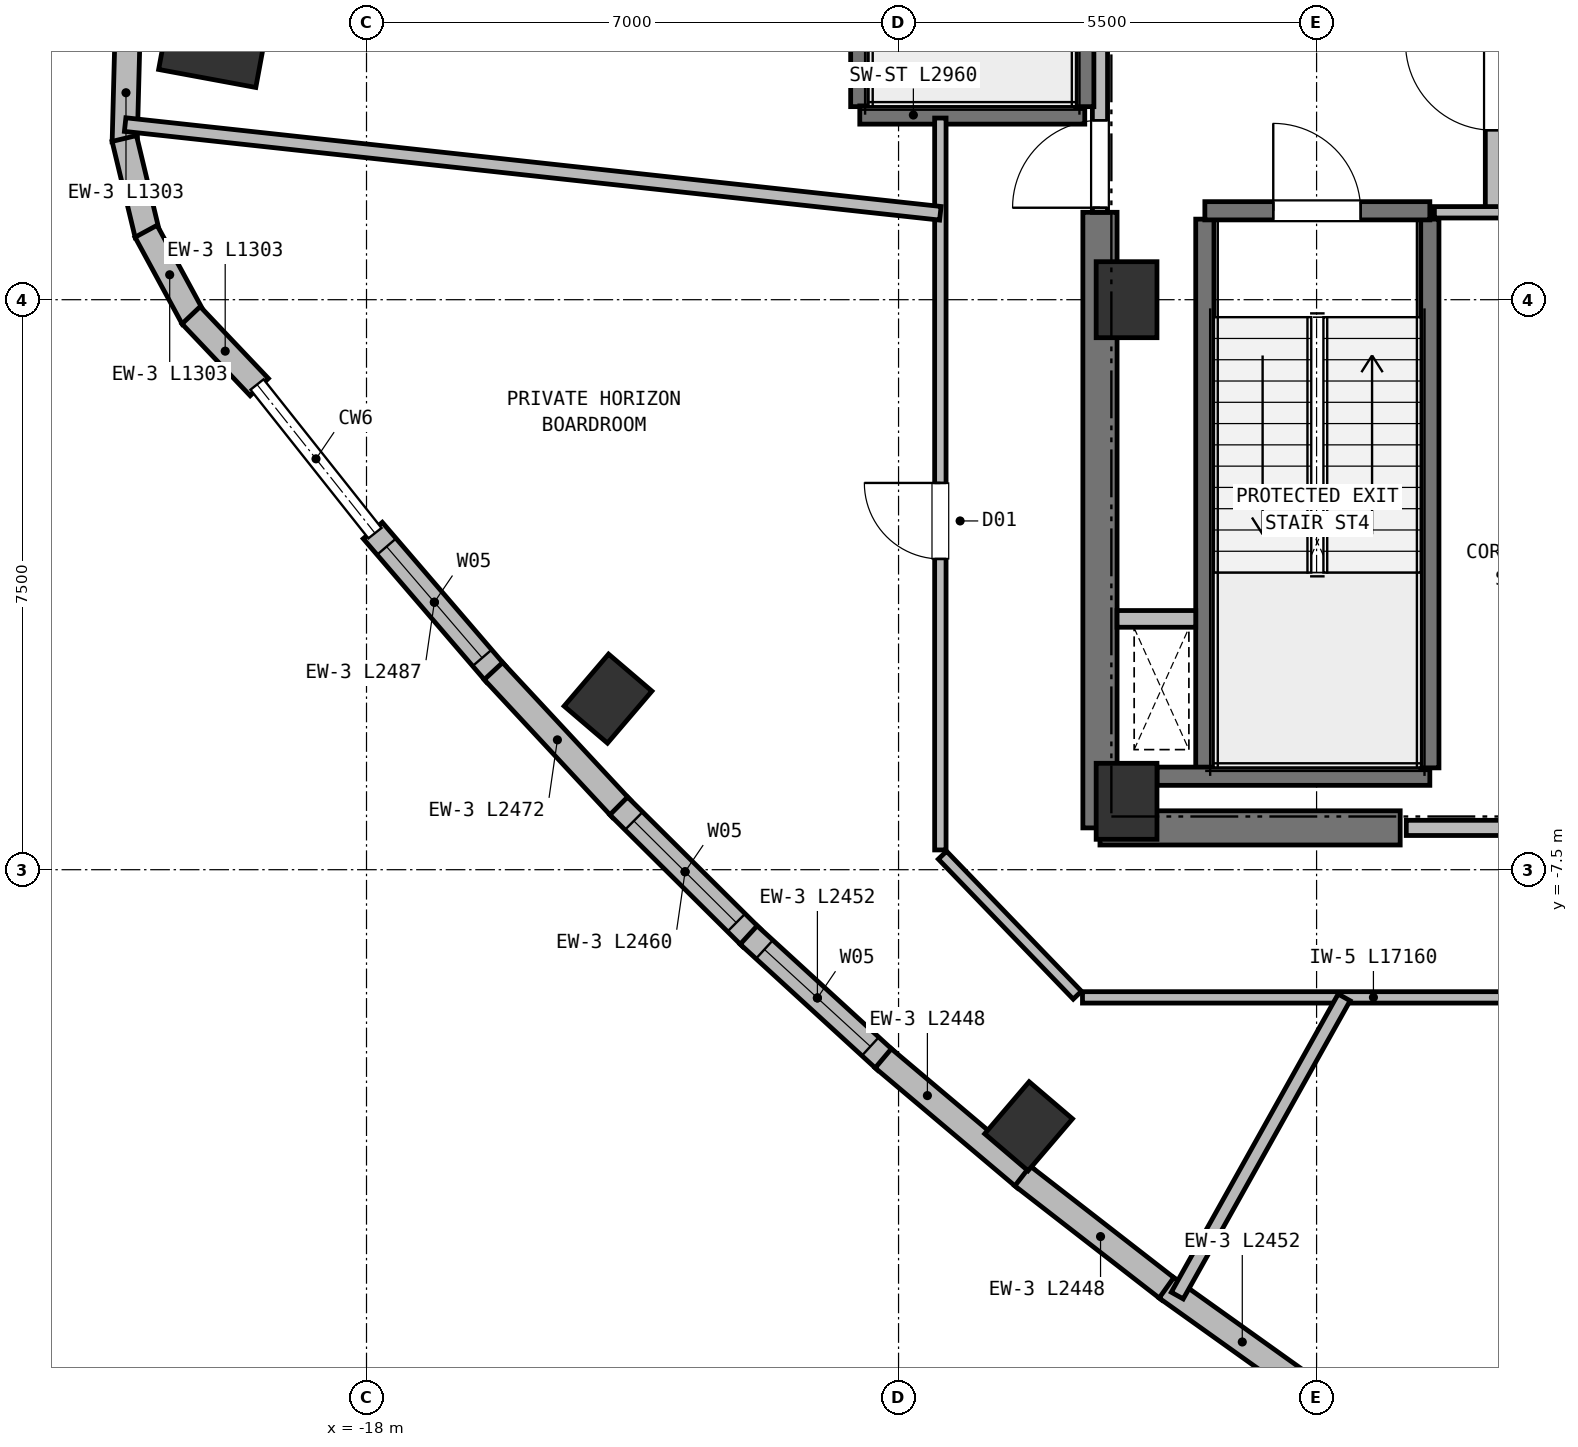
"""IFC4 building model, lengths in metres.
Left out: names, types, materials, properties, quantities, classifications, styles, units other than length and angle.
Written with IfcOpenShell. Run it as: python <this file> out.ifc"""

import sys

from ifc_helpers import new_model, si_unit, direction, frame, frame_2d, origin, origin_2d, place, context, subcontext, project, spatial, rectangle, extrude, element, fill, save


model = new_model("IFC4")
c1 = context("Model", 3, precision=1e-05, world=origin(), true_north=direction((0.0, 1.0)))
c2 = subcontext(c1, "Body", "Model", "MODEL_VIEW")
j1 = project(units=[si_unit("LENGTHUNIT", "METRE"), si_unit("PLANEANGLEUNIT", "RADIAN")], contexts=[c1])
p1 = place(None, origin())
s1 = spatial("IfcSite", under=j1, at=p1, CompositionType="ELEMENT")
p2 = place(p1, origin())
s2 = spatial("IfcBuilding", under=s1, at=p2, CompositionType="ELEMENT")
p3 = place(p2, frame((0.0, 0.0, 277.2)))
s3 = spatial("IfcBuildingStorey", under=s2, at=p3, CompositionType="ELEMENT", Elevation=277.2)
for number, where, z_axis, x_axis in (
    (1, (-8.0, -6.6, 0.0), (0.0, 0.0, 1.0), (1.0, 0.0, 0.0)),
    (2, (-8.0, 0.0, 0.0), (0.0, 0.0, 1.0), (1.0, 0.0, 0.0)),
):
    element("IfcColumn", number, at=place(p3, frame(where, z_axis=z_axis, x_axis=x_axis)), inside=s3, PredefinedType="COLUMN", context=c2, shape_type="SweptSolid", body=[
        extrude(rectangle(XDim=0.8, YDim=1.0, at=origin_2d()), origin(), (0.0, 0.0, 1.0), 4.4),
    ])
p4 = place(p3, frame((-8.35, -6.95, 0.0), z_axis=(0.0, 0.0, 1.0), x_axis=(1.0, 0.0, 0.0)))
e3 = element("IfcWall", 3, at=p4, inside=s3, PredefinedType="SHEAR", context=c2, shape_type="SweptSolid", body=[
    extrude(rectangle(XDim=3.95, YDim=0.45, at=frame_2d((1.975, 0.0))), origin(), (0.0, 0.0, 1.0), 4.15),
])
p5 = place(p3, frame((-8.35, -6.95, 0.0), z_axis=(0.0, 0.0, 1.0), x_axis=(0.0, 1.0, 0.0)))
e4 = element("IfcWall", 4, at=p5, inside=s3, PredefinedType="SHEAR", context=c2, shape_type="SweptSolid", body=[
    extrude(rectangle(XDim=8.1, YDim=0.45, at=frame_2d((4.05, 0.0))), origin(), (0.0, 0.0, 1.0), 4.15),
])
p6 = place(p3, frame((-19.95, 3.698, 0.0), z_axis=(0.0, 0.0, 1.0), x_axis=(-0.983254907564, 0.182235525492, 0.0)))
e5 = element("IfcColumn", 5, at=p6, inside=s3, PredefinedType="COLUMN", context=c2, shape_type="SweptSolid", body=[
    extrude(rectangle(XDim=1.3, YDim=1.6, at=origin_2d()), origin(), (0.0, 0.0, 1.0), 4.4),
])
for number, where, z_axis, x_axis in (
    (6, (-14.823, -5.249, 0.0), (0.0, 0.0, 1.0), (-0.76, 0.649, 0.0)),
    (7, (-9.289, -10.876, 0.0), (0.0, 0.0, 1.0), (-0.76, 0.649, 0.0)),
):
    element("IfcColumn", number, at=place(p3, frame(where, z_axis=z_axis, x_axis=x_axis)), inside=s3, PredefinedType="COLUMN", context=c2, shape_type="SweptSolid", body=[
        extrude(rectangle(XDim=0.75, YDim=0.9, at=origin_2d()), origin(), (0.0, 0.0, 1.0), 4.4),
    ])
for number, where, z_axis, x_axis in (
    (8, (-21.182, 2.072, 0.0), (0.0, 0.0, 1.0), (0.026, 1.0, 0.0)),
    (9, (-20.883, 0.854, 0.0), (0.0, 0.0, 1.0), (-0.233, 0.972, 0.0)),
    (10, (-20.279, -0.245, 0.0), (0.0, 0.0, 1.0), (-0.477, 0.879, 0.0)),
):
    element("IfcWall", number, at=place(p3, frame(where, z_axis=z_axis, x_axis=x_axis)), inside=s3, PredefinedType="SOLIDWALL", context=c2, shape_type="SweptSolid", body=[
        extrude(rectangle(XDim=1.303, YDim=0.33, at=frame_2d((0.651, 0.0))), origin(), (0.0, 0.0, 1.0), 4.15),
    ])
p7 = place(p3, frame((-19.411, -1.15, 0.0), z_axis=(0.0, 0.0, 1.0), x_axis=(-0.688316050819, 0.725410927809, 0.0)))
e11 = element("IfcWall", 11, at=p7, inside=s3, PredefinedType="SOLIDWALL", context=c2, shape_type="SweptSolid", body=[
    extrude(rectangle(XDim=1.303, YDim=0.33, at=frame_2d((0.652, 0.0))), origin(), (0.0, 0.0, 1.0), 4.15),
])
p8 = place(p3, frame((-16.297, -4.924, 0.0), z_axis=(0.0, 0.0, 1.0), x_axis=(-0.651591190477, 0.75857031348, 0.0)))
e12 = element("IfcWall", 12, at=p8, inside=s3, PredefinedType="SOLIDWALL", context=c2, shape_type="SweptSolid", body=[
    extrude(rectangle(XDim=2.488, YDim=0.33, at=frame_2d((1.244, 0.0))), origin(), (0.0, 0.0, 1.0), 4.15),
])
p9 = place(p8, frame((0.279, 0.0, 0.72)))
e13 = element("IfcOpeningElement", 13, at=p9, cuts=e12, PredefinedType="OPENING", context=c2, shape_type="SweptSolid", body=[
    extrude(rectangle(XDim=1.93, YDim=2.15, at=frame_2d((0.965, 1.075))), frame((0.0, 0.175, 0.0), z_axis=(0.0, -1.0, 0.0), x_axis=(1.0, 0.0, 0.0)), (0.0, 0.0, 1.0), 0.35),
])
p10 = place(p3, frame((-14.647, -6.697, 0.0), z_axis=(0.0, 0.0, 1.0), x_axis=(-0.681011582837, 0.732272643242, 0.0)))
e14 = element("IfcWall", 14, at=p10, inside=s3, PredefinedType="SOLIDWALL", context=c2, shape_type="SweptSolid", body=[
    extrude(rectangle(XDim=2.472, YDim=0.33, at=frame_2d((1.236, 0.0))), origin(), (0.0, 0.0, 1.0), 4.15),
])
p11 = place(p3, frame((-12.936, -8.394, 0.0), z_axis=(0.0, 0.0, 1.0), x_axis=(-0.709682736457, 0.704521407464, 0.0)))
e15 = element("IfcWall", 15, at=p11, inside=s3, PredefinedType="SOLIDWALL", context=c2, shape_type="SweptSolid", body=[
    extrude(rectangle(XDim=2.46, YDim=0.33, at=frame_2d((1.23, 0.0))), origin(), (0.0, 0.0, 1.0), 4.15),
])
p12 = place(p11, frame((0.28, 0.0, 0.72)))
e16 = element("IfcOpeningElement", 16, at=p12, cuts=e15, PredefinedType="OPENING", context=c2, shape_type="SweptSolid", body=[
    extrude(rectangle(XDim=1.9, YDim=2.15, at=frame_2d((0.95, 1.075))), frame((0.0, 0.175, 0.0), z_axis=(0.0, -1.0, 0.0), x_axis=(1.0, 0.0, 0.0)), (0.0, 0.0, 1.0), 0.35),
])
p13 = place(p3, frame((-11.164, -10.015, 0.0), z_axis=(0.0, 0.0, 1.0), x_axis=(-0.73744340021, 0.675408936487, 0.0)))
e17 = element("IfcWall", 17, at=p13, inside=s3, PredefinedType="SOLIDWALL", context=c2, shape_type="SweptSolid", body=[
    extrude(rectangle(XDim=2.452, YDim=0.33, at=frame_2d((1.226, 0.0))), origin(), (0.0, 0.0, 1.0), 4.15),
])
p14 = place(p13, frame((0.281, 0.0, 0.72)))
e18 = element("IfcOpeningElement", 18, at=p14, cuts=e17, PredefinedType="OPENING", context=c2, shape_type="SweptSolid", body=[
    extrude(rectangle(XDim=1.89, YDim=2.15, at=frame_2d((0.945, 1.075))), frame((0.0, 0.175, 0.0), z_axis=(0.0, -1.0, 0.0), x_axis=(1.0, 0.0, 0.0)), (0.0, 0.0, 1.0), 0.35),
])
p15 = place(p3, frame((-9.33, -11.561, 0.0), z_axis=(0.0, 0.0, 1.0), x_axis=(-0.764225429478, 0.644949217334, 0.0)))
e19 = element("IfcWall", 19, at=p15, inside=s3, PredefinedType="SOLIDWALL", context=c2, shape_type="SweptSolid", body=[
    extrude(rectangle(XDim=2.448, YDim=0.33, at=frame_2d((1.224, 0.0))), origin(), (0.0, 0.0, 1.0), 4.15),
])
p16 = place(p3, frame((-7.435, -13.031, 0.0), z_axis=(0.0, 0.0, 1.0), x_axis=(-0.789786954421, 0.613381257152, 0.0)))
e20 = element("IfcWall", 20, at=p16, inside=s3, PredefinedType="SOLIDWALL", context=c2, shape_type="SweptSolid", body=[
    extrude(rectangle(XDim=2.448, YDim=0.33, at=frame_2d((1.224, 0.0))), origin(), (0.0, 0.0, 1.0), 4.15),
])
p17 = place(p3, frame((-5.48, -14.427, 0.0), z_axis=(0.0, 0.0, 1.0), x_axis=(-0.813854547638, 0.581068649378, 0.0)))
e21 = element("IfcWall", 21, at=p17, inside=s3, PredefinedType="SOLIDWALL", context=c2, shape_type="SweptSolid", body=[
    extrude(rectangle(XDim=2.452, YDim=0.33, at=frame_2d((1.226, 0.0))), origin(), (0.0, 0.0, 1.0), 4.15),
])
p18 = place(p3, frame((-6.97, -6.16, 0.0), z_axis=(0.0, 0.0, 1.0), x_axis=(0.0, 1.0, 0.0)))
e22 = element("IfcWall", 22, at=p18, inside=s3, PredefinedType="SHEAR", context=c2, shape_type="SweptSolid", body=[
    extrude(rectangle(XDim=7.22, YDim=0.24, at=frame_2d((3.61, 0.0))), origin(), (0.0, 0.0, 1.0), 4.15),
])
p19 = place(p3, frame((-7.6, -6.27, 0.0), z_axis=(0.0, 0.0, 1.0), x_axis=(1.0, 0.0, 0.0)))
e23 = element("IfcWall", 23, at=p19, inside=s3, PredefinedType="SHEAR", context=c2, shape_type="SweptSolid", body=[
    extrude(rectangle(XDim=3.59, YDim=0.24, at=frame_2d((1.795, 0.0))), origin(), (0.0, 0.0, 1.0), 4.15),
])
p20 = place(p3, frame((-4.01, -6.16, 0.0), z_axis=(0.0, 0.0, 1.0), x_axis=(0.0, 1.0, 0.0)))
e24 = element("IfcWall", 24, at=p20, inside=s3, PredefinedType="SHEAR", context=c2, shape_type="SweptSolid", body=[
    extrude(rectangle(XDim=7.22, YDim=0.24, at=frame_2d((3.61, 0.0))), origin(), (0.0, 0.0, 1.0), 4.15),
])
p21 = place(p3, frame((-6.97, 1.17, 0.0), z_axis=(0.0, 0.0, 1.0), x_axis=(1.0, 0.0, 0.0)))
e25 = element("IfcWall", 25, at=p21, inside=s3, PredefinedType="SHEAR", context=c2, shape_type="SweptSolid", body=[
    extrude(rectangle(XDim=2.96, YDim=0.24, at=frame_2d((1.48, 0.0))), origin(), (0.0, 0.0, 1.0), 4.15),
])
p22 = place(p21, frame((0.9, 0.0, 0.0)))
e26 = element("IfcOpeningElement", 26, at=p22, cuts=e25, PredefinedType="OPENING", context=c2, shape_type="SweptSolid", body=[
    extrude(rectangle(XDim=1.15, YDim=2.15, at=frame_2d((0.575, 1.075))), frame((0.0, 0.13, 0.0), z_axis=(0.0, -1.0, 0.0), x_axis=(1.0, 0.0, 0.0)), (0.0, 0.0, 1.0), 0.26),
])
p23 = place(p3, frame((-8.125, -4.2, 0.0), z_axis=(0.0, 0.0, 1.0), x_axis=(1.0, 0.0, 0.0)))
e27 = element("IfcWall", 27, at=p23, inside=s3, PredefinedType="PARTITIONING", context=c2, shape_type="SweptSolid", body=[
    extrude(rectangle(XDim=1.035, YDim=0.22, at=frame_2d((0.518, 0.0))), origin(), (0.0, 0.0, 1.0), 4.15),
])
p24 = place(p3, frame((-3.18, 1.15, 0.0), z_axis=(0.0, 0.0, 1.0), x_axis=(0.0, 1.0, 0.0)))
e28 = element("IfcWall", 28, at=p24, inside=s3, PredefinedType="PARTITIONING", context=c2, shape_type="SweptSolid", body=[
    extrude(rectangle(XDim=3.3, YDim=0.2, at=frame_2d((1.65, 0.0))), origin(), (0.0, 0.0, 1.0), 4.15),
])
p25 = place(p24, frame((1.08, 0.0, 0.0)))
e29 = element("IfcOpeningElement", 29, at=p25, cuts=e28, PredefinedType="OPENING", context=c2, shape_type="SweptSolid", body=[
    extrude(rectangle(XDim=1.15, YDim=2.15, at=frame_2d((0.575, 1.075))), frame((0.0, 0.11, 0.0), z_axis=(0.0, -1.0, 0.0), x_axis=(1.0, 0.0, 0.0)), (0.0, 0.0, 1.0), 0.22),
])
p26 = place(p3, frame((-8.35, 1.15, 0.0), z_axis=(0.0, 0.0, 1.0), x_axis=(0.0, 1.0, 0.0)))
e30 = element("IfcWall", 30, at=p26, inside=s3, PredefinedType="PARTITIONING", context=c2, shape_type="SweptSolid", body=[
    extrude(rectangle(XDim=5.4, YDim=0.2, at=frame_2d((2.7, 0.0))), origin(), (0.0, 0.0, 1.0), 4.15),
])
p27 = place(p26, frame((0.06, 0.0, 0.0)))
e31 = element("IfcOpeningElement", 31, at=p27, cuts=e30, PredefinedType="OPENING", context=c2, shape_type="SweptSolid", body=[
    extrude(rectangle(XDim=1.15, YDim=2.15, at=frame_2d((0.575, 1.075))), frame((0.0, 0.11, 0.0), z_axis=(0.0, -1.0, 0.0), x_axis=(1.0, 0.0, 0.0)), (0.0, 0.0, 1.0), 0.22),
])
p28 = place(p3, frame((3.95, 1.15, 0.0), z_axis=(0.0, 0.0, 1.0), x_axis=(-1.0, 0.0, 0.0)))
e32 = element("IfcWall", 32, at=p28, inside=s3, PredefinedType="PARTITIONING", context=c2, shape_type="SweptSolid", body=[
    extrude(rectangle(XDim=7.9, YDim=0.15, at=frame_2d((3.95, 0.0))), origin(), (0.0, 0.0, 1.0), 4.15),
])
p29 = place(p28, frame((5.59, 0.0, 0.0)))
e33 = element("IfcOpeningElement", 33, at=p29, cuts=e32, PredefinedType="OPENING", context=c2, shape_type="SweptSolid", body=[
    extrude(rectangle(XDim=0.92, YDim=2.05, at=frame_2d((0.46, 1.025))), frame((0.0, 0.085, 0.0), z_axis=(0.0, -1.0, 0.0), x_axis=(1.0, 0.0, 0.0)), (0.0, 0.0, 1.0), 0.17),
])
p30 = place(p28, frame((2.14, 0.0, 0.0)))
e34 = element("IfcOpeningElement", 34, at=p30, cuts=e32, PredefinedType="OPENING", context=c2, shape_type="SweptSolid", body=[
    extrude(rectangle(XDim=0.92, YDim=2.05, at=frame_2d((0.46, 1.025))), frame((0.0, 0.085, 0.0), z_axis=(0.0, -1.0, 0.0), x_axis=(1.0, 0.0, 0.0)), (0.0, 0.0, 1.0), 0.17),
])
p31 = place(p3, frame((-4.32, -6.95, 0.0), z_axis=(0.0, 0.0, 1.0), x_axis=(1.0, 0.0, 0.0)))
e35 = element("IfcWall", 35, at=p31, inside=s3, PredefinedType="PARTITIONING", context=c2, shape_type="SweptSolid", body=[
    extrude(rectangle(XDim=8.64, YDim=0.2, at=frame_2d((4.32, 0.0))), origin(), (0.0, 0.0, 1.0), 4.15),
])
p32 = place(p3, frame((-11.51, 2.54, 0.0), z_axis=(0.0, 0.0, 1.0), x_axis=(0.0, 1.0, 0.0)))
e36 = element("IfcWall", 36, at=p32, inside=s3, PredefinedType="SHEAR", context=c2, shape_type="SweptSolid", body=[
    extrude(rectangle(XDim=6.42, YDim=0.24, at=frame_2d((3.21, 0.0))), origin(), (0.0, 0.0, 1.0), 4.15),
])
p33 = place(p3, frame((-11.51, 2.43, 0.0), z_axis=(0.0, 0.0, 1.0), x_axis=(1.0, 0.0, 0.0)))
e37 = element("IfcWall", 37, at=p33, inside=s3, PredefinedType="SHEAR", context=c2, shape_type="SweptSolid", body=[
    extrude(rectangle(XDim=2.96, YDim=0.24, at=frame_2d((1.48, 0.0))), origin(), (0.0, 0.0, 1.0), 4.15),
])
p34 = place(p3, frame((-8.55, 2.54, 0.0), z_axis=(0.0, 0.0, 1.0), x_axis=(0.0, 1.0, 0.0)))
e38 = element("IfcWall", 38, at=p34, inside=s3, PredefinedType="SHEAR", context=c2, shape_type="SweptSolid", body=[
    extrude(rectangle(XDim=6.42, YDim=0.24, at=frame_2d((3.21, 0.0))), origin(), (0.0, 0.0, 1.0), 4.15),
])
p35 = place(p3, frame((8.58, -9.18, 0.0), z_axis=(0.0, 0.0, 1.0), x_axis=(-1.0, 0.0, 0.0)))
e39 = element("IfcWall", 39, at=p35, inside=s3, PredefinedType="PARTITIONING", context=c2, shape_type="SweptSolid", body=[
    extrude(rectangle(XDim=17.16, YDim=0.15, at=frame_2d((8.58, 0.0))), origin(), (0.0, 0.0, 1.0), 3.86),
])
p36 = place(p35, frame((2.405, 0.0, 0.0)))
e40 = element("IfcOpeningElement", 40, at=p36, cuts=e39, PredefinedType="OPENING", context=c2, shape_type="SweptSolid", body=[
    extrude(rectangle(XDim=0.95, YDim=2.1, at=frame_2d((0.475, 1.05))), frame((0.0, 0.085, 0.0), z_axis=(0.0, -1.0, 0.0), x_axis=(1.0, 0.0, 0.0)), (0.0, 0.0, 1.0), 0.17),
])
p37 = place(p35, frame((8.404, 0.0, 0.0)))
e41 = element("IfcOpeningElement", 41, at=p37, cuts=e39, PredefinedType="OPENING", context=c2, shape_type="SweptSolid", body=[
    extrude(rectangle(XDim=1.0, YDim=2.15, at=frame_2d((0.5, 1.075))), frame((0.0, 0.085, 0.0), z_axis=(0.0, -1.0, 0.0), x_axis=(1.0, 0.0, 0.0)), (0.0, 0.0, 1.0), 0.17),
])
p38 = place(p3, frame((-10.45, -7.24, 0.0), z_axis=(0.0, 0.0, 1.0), x_axis=(0.0, 1.0, 0.0)))
e42 = element("IfcWall", 42, at=p38, inside=s3, PredefinedType="PARTITIONING", context=c2, shape_type="SweptSolid", body=[
    extrude(rectangle(XDim=9.63, YDim=0.15, at=frame_2d((4.815, 0.0))), origin(), (0.0, 0.0, 1.0), 4.15),
])
p39 = place(p38, frame((3.829, 0.0, 0.0)))
e43 = element("IfcOpeningElement", 43, at=p39, cuts=e42, PredefinedType="OPENING", context=c2, shape_type="SweptSolid", body=[
    extrude(rectangle(XDim=1.0, YDim=2.15, at=frame_2d((0.5, 1.075))), frame((0.0, 0.085, 0.0), z_axis=(0.0, -1.0, 0.0), x_axis=(1.0, 0.0, 0.0)), (0.0, 0.0, 1.0), 0.17),
])
p40 = place(p3, frame((-8.648, -9.151, 0.0), z_axis=(0.0, 0.0, 1.0), x_axis=(-0.693764562202, 0.720201869085, 0.0)))
e44 = element("IfcWall", 44, at=p40, inside=s3, PredefinedType="PARTITIONING", context=c2, shape_type="SweptSolid", body=[
    extrude(rectangle(XDim=2.558, YDim=0.15, at=frame_2d((1.279, 0.0))), origin(), (0.0, 0.0, 1.0), 4.15),
])
p41 = place(p3, frame((-10.45, 1.137, 0.0), z_axis=(0.0, 0.0, 1.0), x_axis=(-0.994132831071, 0.108166141594, 0.0)))
e45 = element("IfcWall", 45, at=p41, inside=s3, PredefinedType="PARTITIONING", context=c2, shape_type="SweptSolid", body=[
    extrude(rectangle(XDim=10.789, YDim=0.18, at=frame_2d((5.395, 0.0))), origin(), (0.0, 0.0, 1.0), 4.15),
])
p42 = place(p3, frame((-5.137, -9.18, 0.0), z_axis=(0.0, 0.0, 1.0), x_axis=(-0.488323904918, -0.872662457016, 0.0)))
e46 = element("IfcWall", 46, at=p42, inside=s3, PredefinedType="PARTITIONING", context=c2, shape_type="SweptSolid", body=[
    extrude(rectangle(XDim=4.496, YDim=0.18, at=frame_2d((2.248, 0.0))), origin(), (0.0, 0.0, 1.0), 4.15),
])
p43 = place(p9, origin())
e47 = element("IfcWindow", 47, at=p43, inside=s3, PartitioningType="SINGLE_PANEL", PredefinedType="WINDOW", context=c2, shape_type="SweptSolid", body=[
    extrude(rectangle(XDim=1.93, YDim=2.15, at=frame_2d((0.965, 1.075))), frame((0.0, 0.03, 0.0), z_axis=(0.0, -1.0, 0.0), x_axis=(1.0, 0.0, 0.0)), (0.0, 0.0, 1.0), 0.06),
])
fill(e13, e47)
p44 = place(p12, origin())
e48 = element("IfcWindow", 48, at=p44, inside=s3, PartitioningType="SINGLE_PANEL", PredefinedType="WINDOW", context=c2, shape_type="SweptSolid", body=[
    extrude(rectangle(XDim=1.9, YDim=2.15, at=frame_2d((0.95, 1.075))), frame((0.0, 0.03, 0.0), z_axis=(0.0, -1.0, 0.0), x_axis=(1.0, 0.0, 0.0)), (0.0, 0.0, 1.0), 0.06),
])
fill(e16, e48)
p45 = place(p14, origin())
e49 = element("IfcWindow", 49, at=p45, inside=s3, PartitioningType="SINGLE_PANEL", PredefinedType="WINDOW", context=c2, shape_type="SweptSolid", body=[
    extrude(rectangle(XDim=1.89, YDim=2.15, at=frame_2d((0.945, 1.075))), frame((0.0, 0.03, 0.0), z_axis=(0.0, -1.0, 0.0), x_axis=(1.0, 0.0, 0.0)), (0.0, 0.0, 1.0), 0.06),
])
fill(e18, e49)
p46 = place(p22, origin())
e50 = element("IfcDoor", 50, at=p46, inside=s3, OperationType="SINGLE_SWING_LEFT", PredefinedType="DOOR", context=c2, shape_type="SweptSolid", body=[
    extrude(rectangle(XDim=1.15, YDim=2.15, at=frame_2d((0.575, 1.075))), frame((0.0, 0.025, 0.0), z_axis=(0.0, -1.0, 0.0), x_axis=(1.0, 0.0, 0.0)), (0.0, 0.0, 1.0), 0.05),
])
fill(e26, e50)
p47 = place(p25, origin())
e51 = element("IfcDoor", 51, at=p47, inside=s3, OperationType="SINGLE_SWING_RIGHT", PredefinedType="DOOR", context=c2, shape_type="SweptSolid", body=[
    extrude(rectangle(XDim=1.15, YDim=2.15, at=frame_2d((0.575, 1.075))), frame((0.0, 0.025, 0.0), z_axis=(0.0, -1.0, 0.0), x_axis=(1.0, 0.0, 0.0)), (0.0, 0.0, 1.0), 0.05),
])
fill(e29, e51)
p48 = place(p27, origin())
e52 = element("IfcDoor", 52, at=p48, inside=s3, OperationType="SINGLE_SWING_LEFT", PredefinedType="DOOR", context=c2, shape_type="SweptSolid", body=[
    extrude(rectangle(XDim=1.15, YDim=2.15, at=frame_2d((0.575, 1.075))), frame((0.0, 0.025, 0.0), z_axis=(0.0, -1.0, 0.0), x_axis=(1.0, 0.0, 0.0)), (0.0, 0.0, 1.0), 0.05),
])
fill(e31, e52)
p49 = place(p39, origin())
e53 = element("IfcDoor", 53, at=p49, inside=s3, OperationType="SINGLE_SWING_RIGHT", PredefinedType="DOOR", context=c2, shape_type="SweptSolid", body=[
    extrude(rectangle(XDim=1.0, YDim=2.15, at=frame_2d((0.5, 1.075))), frame((0.0, 0.025, 0.0), z_axis=(0.0, -1.0, 0.0), x_axis=(1.0, 0.0, 0.0)), (0.0, 0.0, 1.0), 0.05),
])
fill(e43, e53)
save(model, sys.argv[1])
